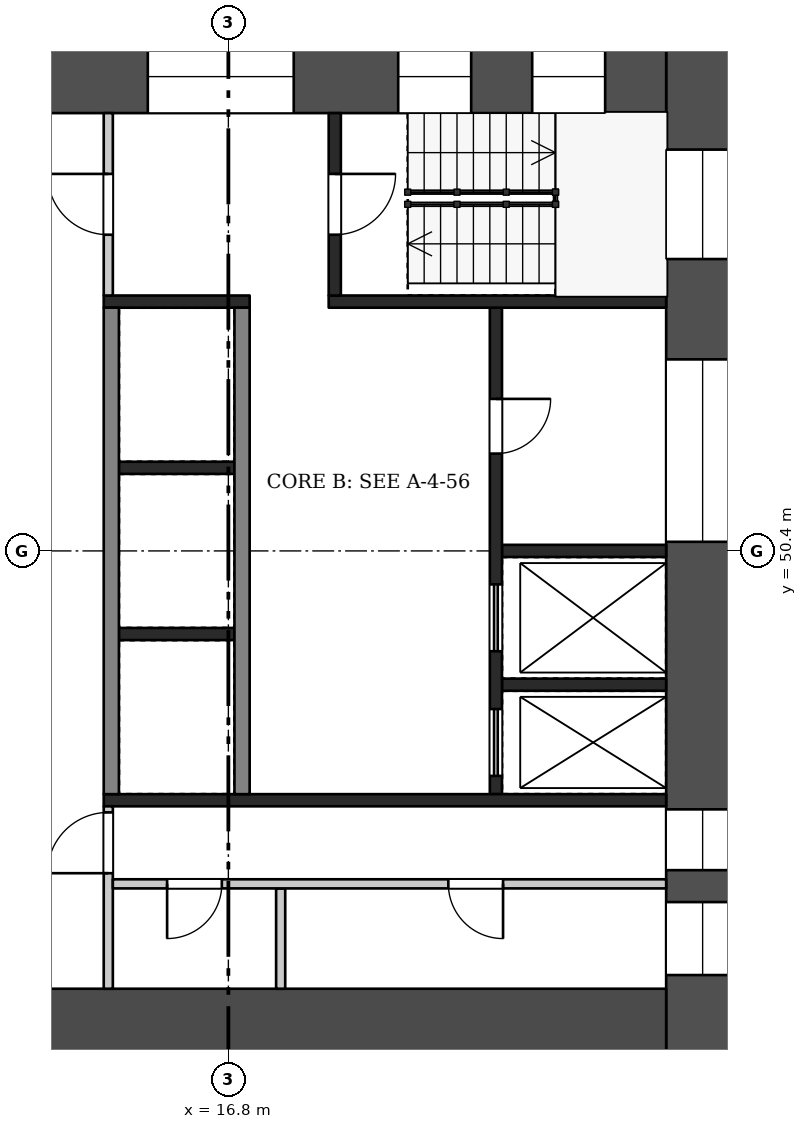
"""IFC4 building model, lengths in metres.
Left out: names, types, materials, properties, quantities, classifications, styles, units other than length and angle.
Written with IfcOpenShell. Run it as: python <this file> out.ifc"""

import sys

from ifc_helpers import new_model, si_unit, direction, frame, frame_2d, origin, place, context, subcontext, project, spatial, rectangle, extrude, element, fill, save


model = new_model("IFC4")
c1 = context("Model", 3, precision=1e-05, world=origin(), true_north=direction((0.0, 1.0)))
c2 = subcontext(c1, "Body", "Model", "MODEL_VIEW")
j1 = project(units=[si_unit("LENGTHUNIT", "METRE"), si_unit("PLANEANGLEUNIT", "RADIAN")], contexts=[c1])
p1 = place(None, origin())
s1 = spatial("IfcSite", under=j1, at=p1, CompositionType="ELEMENT")
p2 = place(p1, origin())
s2 = spatial("IfcBuilding", under=s1, at=p2, CompositionType="ELEMENT")
p3 = place(p2, frame((0.0, 0.0, 126.7)))
s3 = spatial("IfcBuildingStorey", under=s2, at=p3, CompositionType="ELEMENT", Elevation=126.7)
p4 = place(p3, frame((24.6, 58.8, 0.0), z_axis=(0.0, 0.0, 1.0), x_axis=(0.0, -1.0, 0.0)))
e1 = element("IfcWall", 1, at=p4, inside=s3, PredefinedType="SHEAR", context=c2, shape_type="SweptSolid", body=[
    extrude(rectangle(XDim=16.8, YDim=1.2, at=frame_2d((8.4, 0.0))), origin(), (0.0, 0.0, 1.0), 3.22),
])
p5 = place(p4, frame((1.8, 0.0, 0.5)))
e2 = element("IfcOpeningElement", 2, at=p5, cuts=e1, PredefinedType="OPENING", context=c2, shape_type="SweptSolid", body=[
    extrude(rectangle(XDim=1.8, YDim=2.4, at=frame_2d((0.9, 1.2))), frame((0.0, 0.61, 0.0), z_axis=(0.0, -1.0, 0.0), x_axis=(1.0, 0.0, 0.0)), (0.0, 0.0, 1.0), 1.22),
])
p6 = place(p4, frame((5.25, 0.0, 1.6)))
e3 = element("IfcOpeningElement", 3, at=p6, cuts=e1, PredefinedType="OPENING", context=c2, shape_type="SweptSolid", body=[
    extrude(rectangle(XDim=3.0, YDim=1.2, at=frame_2d((1.5, 0.6))), frame((0.0, 0.61, 0.0), z_axis=(0.0, -1.0, 0.0), x_axis=(1.0, 0.0, 0.0)), (0.0, 0.0, 1.0), 1.22),
])
p7 = place(p4, frame((12.65, 0.0, 0.6)))
e4 = element("IfcOpeningElement", 4, at=p7, cuts=e1, PredefinedType="OPENING", context=c2, shape_type="SweptSolid", body=[
    extrude(rectangle(XDim=1.0, YDim=2.1, at=frame_2d((0.5, 1.05))), frame((0.0, 0.61, 0.0), z_axis=(0.0, -1.0, 0.0), x_axis=(1.0, 0.0, 0.0)), (0.0, 0.0, 1.0), 1.22),
])
p8 = place(p4, frame((14.175, 0.0, 1.6)))
e5 = element("IfcOpeningElement", 5, at=p8, cuts=e1, PredefinedType="OPENING", context=c2, shape_type="SweptSolid", body=[
    extrude(rectangle(XDim=1.2, YDim=1.2, at=frame_2d((0.6, 0.6))), frame((0.0, 0.61, 0.0), z_axis=(0.0, -1.0, 0.0), x_axis=(1.0, 0.0, 0.0)), (0.0, 0.0, 1.0), 1.22),
])
p9 = place(p3, frame((9.6, 58.2, 0.0), z_axis=(0.0, 0.0, 1.0), x_axis=(1.0, 0.0, 0.0)))
e6 = element("IfcWall", 6, at=p9, inside=s3, PredefinedType="SHEAR", context=c2, shape_type="SweptSolid", body=[
    extrude(rectangle(XDim=14.4, YDim=1.2, at=frame_2d((7.2, 0.0))), origin(), (0.0, 0.0, 1.0), 3.22),
])
p10 = place(p9, frame((1.105, 0.0, 0.6)))
e7 = element("IfcOpeningElement", 7, at=p10, cuts=e6, PredefinedType="OPENING", context=c2, shape_type="SweptSolid", body=[
    extrude(rectangle(XDim=3.0, YDim=2.1, at=frame_2d((1.5, 1.05))), frame((0.0, 0.61, 0.0), z_axis=(0.0, -1.0, 0.0), x_axis=(1.0, 0.0, 0.0)), (0.0, 0.0, 1.0), 1.22),
])
p11 = place(p9, frame((5.875, 0.0, 0.6)))
e8 = element("IfcOpeningElement", 8, at=p11, cuts=e6, PredefinedType="OPENING", context=c2, shape_type="SweptSolid", body=[
    extrude(rectangle(XDim=2.4, YDim=2.1, at=frame_2d((1.2, 1.05))), frame((0.0, 0.61, 0.0), z_axis=(0.0, -1.0, 0.0), x_axis=(1.0, 0.0, 0.0)), (0.0, 0.0, 1.0), 1.22),
])
p12 = place(p9, frame((9.993, 0.0, 0.5)))
e9 = element("IfcOpeningElement", 9, at=p12, cuts=e6, PredefinedType="OPENING", context=c2, shape_type="SweptSolid", body=[
    extrude(rectangle(XDim=1.2, YDim=2.4, at=frame_2d((0.6, 1.2))), frame((0.0, 0.61, 0.0), z_axis=(0.0, -1.0, 0.0), x_axis=(1.0, 0.0, 0.0)), (0.0, 0.0, 1.0), 1.22),
])
p13 = place(p9, frame((12.197, 0.0, 0.5)))
e10 = element("IfcOpeningElement", 10, at=p13, cuts=e6, PredefinedType="OPENING", context=c2, shape_type="SweptSolid", body=[
    extrude(rectangle(XDim=1.2, YDim=2.4, at=frame_2d((0.6, 1.2))), frame((0.0, 0.61, 0.0), z_axis=(0.0, -1.0, 0.0), x_axis=(1.0, 0.0, 0.0)), (0.0, 0.0, 1.0), 1.22),
])
p14 = place(p3, frame((9.6, 42.6, 0.0), z_axis=(0.0, 0.0, 1.0), x_axis=(1.0, 0.0, 0.0)))
e11 = element("IfcWall", 11, at=p14, inside=s3, PredefinedType="SHEAR", context=c2, shape_type="SweptSolid", body=[
    extrude(rectangle(XDim=14.4, YDim=1.2, at=frame_2d((7.2, 0.0))), origin(), (0.0, 0.0, 1.0), 3.22),
])
p15 = place(p14, frame((2.1, 0.0, 0.0)))
e12 = element("IfcOpeningElement", 12, at=p15, cuts=e11, PredefinedType="OPENING", context=c2, shape_type="SweptSolid", body=[
    extrude(rectangle(XDim=1.8, YDim=2.1, at=frame_2d((0.9, 1.05))), frame((0.0, 0.61, 0.0), z_axis=(0.0, -1.0, 0.0), x_axis=(1.0, 0.0, 0.0)), (0.0, 0.0, 1.0), 1.22),
])
for number, where, z_axis, x_axis in (
    (13, (15.0, 51.767, 0.0), (0.0, 0.0, 1.0), (1.0, 0.0, 0.0)),
    (14, (15.0, 49.033, 0.0), (0.0, 0.0, 1.0), (1.0, 0.0, 0.0)),
):
    element("IfcWall", number, at=place(p3, frame(where, z_axis=z_axis, x_axis=x_axis)), inside=s3, PredefinedType="SHEAR", context=c2, shape_type="SweptSolid", body=[
        extrude(rectangle(XDim=1.9, YDim=0.2, at=frame_2d((0.95, 0.0))), origin(), (0.0, 0.0, 1.0), 3.22),
    ])
for number, where, z_axis, x_axis in (
    (15, (14.875, 54.4, 0.0), (0.0, 0.0, 1.0), (0.0, -1.0, 0.0)),
    (16, (17.025, 54.4, 0.0), (0.0, 0.0, 1.0), (0.0, -1.0, 0.0)),
):
    element("IfcWall", number, at=place(p3, frame(where, z_axis=z_axis, x_axis=x_axis)), inside=s3, PredefinedType="SHEAR", context=c2, shape_type="SweptSolid", body=[
        extrude(rectangle(XDim=8.0, YDim=0.25, at=frame_2d((4.0, 0.0))), origin(), (0.0, 0.0, 1.0), 3.22),
    ])
for number, where, z_axis, x_axis in (
    (17, (21.3, 50.4, 0.0), (0.0, 0.0, 1.0), (1.0, 0.0, 0.0)),
    (18, (21.3, 48.2, 0.0), (0.0, 0.0, 1.0), (1.0, 0.0, 0.0)),
):
    element("IfcWall", number, at=place(p3, frame(where, z_axis=z_axis, x_axis=x_axis)), inside=s3, PredefinedType="SHEAR", context=c2, shape_type="SweptSolid", body=[
        extrude(rectangle(XDim=2.7, YDim=0.2, at=frame_2d((1.35, 0.0))), origin(), (0.0, 0.0, 1.0), 3.22),
    ])
p16 = place(p3, frame((21.2, 54.4, 0.0), z_axis=(0.0, 0.0, 1.0), x_axis=(0.0, -1.0, 0.0)))
e19 = element("IfcWall", 19, at=p16, inside=s3, PredefinedType="SHEAR", context=c2, shape_type="SweptSolid", body=[
    extrude(rectangle(XDim=8.0, YDim=0.2, at=frame_2d((4.0, 0.0))), origin(), (0.0, 0.0, 1.0), 3.22),
])
p17 = place(p16, frame((1.5, 0.0, 0.0)))
e20 = element("IfcOpeningElement", 20, at=p17, cuts=e19, PredefinedType="OPENING", context=c2, shape_type="SweptSolid", body=[
    extrude(rectangle(XDim=0.9, YDim=2.1, at=frame_2d((0.45, 1.05))), frame((0.0, 0.11, 0.0), z_axis=(0.0, -1.0, 0.0), x_axis=(1.0, 0.0, 0.0)), (0.0, 0.0, 1.0), 0.22),
])
p18 = place(p16, frame((4.55, 0.0, 0.0)))
e21 = element("IfcOpeningElement", 21, at=p18, cuts=e19, PredefinedType="OPENING", context=c2, shape_type="SweptSolid", body=[
    extrude(rectangle(XDim=1.1, YDim=2.1, at=frame_2d((0.55, 1.05))), frame((0.0, 0.11, 0.0), z_axis=(0.0, -1.0, 0.0), x_axis=(1.0, 0.0, 0.0)), (0.0, 0.0, 1.0), 0.22),
])
p19 = place(p16, frame((6.6, 0.0, 0.0)))
e22 = element("IfcOpeningElement", 22, at=p19, cuts=e19, PredefinedType="OPENING", context=c2, shape_type="SweptSolid", body=[
    extrude(rectangle(XDim=1.1, YDim=2.1, at=frame_2d((0.55, 1.05))), frame((0.0, 0.11, 0.0), z_axis=(0.0, -1.0, 0.0), x_axis=(1.0, 0.0, 0.0)), (0.0, 0.0, 1.0), 0.22),
])
p20 = place(p3, frame((14.75, 54.5, 0.0), z_axis=(0.0, 0.0, 1.0), x_axis=(1.0, 0.0, 0.0)))
e23 = element("IfcWall", 23, at=p20, inside=s3, PredefinedType="SHEAR", context=c2, shape_type="SweptSolid", body=[
    extrude(rectangle(XDim=2.4, YDim=0.2, at=frame_2d((1.2, 0.0))), origin(), (0.0, 0.0, 1.0), 3.22),
])
p21 = place(p3, frame((18.45, 54.5, 0.0), z_axis=(0.0, 0.0, 1.0), x_axis=(1.0, 0.0, 0.0)))
e24 = element("IfcWall", 24, at=p21, inside=s3, PredefinedType="SHEAR", context=c2, shape_type="SweptSolid", body=[
    extrude(rectangle(XDim=5.55, YDim=0.2, at=frame_2d((2.775, 0.0))), origin(), (0.0, 0.0, 1.0), 3.22),
])
p22 = place(p3, frame((14.825, 57.6, 0.0), z_axis=(0.0, 0.0, 1.0), x_axis=(0.0, -1.0, 0.0)))
e25 = element("IfcWall", 25, at=p22, inside=s3, PredefinedType="PARTITIONING", context=c2, shape_type="SweptSolid", body=[
    extrude(rectangle(XDim=3.0, YDim=0.15, at=frame_2d((1.5, 0.0))), origin(), (0.0, 0.0, 1.0), 3.22),
])
p23 = place(p22, frame((1.0, 0.0, 0.0)))
e26 = element("IfcOpeningElement", 26, at=p23, cuts=e25, PredefinedType="OPENING", context=c2, shape_type="SweptSolid", body=[
    extrude(rectangle(XDim=1.0, YDim=2.1, at=frame_2d((0.5, 1.05))), frame((0.0, 0.085, 0.0), z_axis=(0.0, -1.0, 0.0), x_axis=(1.0, 0.0, 0.0)), (0.0, 0.0, 1.0), 0.17),
])
p24 = place(p3, frame((18.55, 57.6, 0.0), z_axis=(0.0, 0.0, 1.0), x_axis=(0.0, -1.0, 0.0)))
e27 = element("IfcWall", 27, at=p24, inside=s3, PredefinedType="SHEAR", context=c2, shape_type="SweptSolid", body=[
    extrude(rectangle(XDim=3.0, YDim=0.2, at=frame_2d((1.5, 0.0))), origin(), (0.0, 0.0, 1.0), 3.22),
])
p25 = place(p24, frame((1.0, 0.0, 0.0)))
e28 = element("IfcOpeningElement", 28, at=p25, cuts=e27, PredefinedType="OPENING", context=c2, shape_type="SweptSolid", body=[
    extrude(rectangle(XDim=1.0, YDim=2.1, at=frame_2d((0.5, 1.05))), frame((0.0, 0.11, 0.0), z_axis=(0.0, -1.0, 0.0), x_axis=(1.0, 0.0, 0.0)), (0.0, 0.0, 1.0), 0.22),
])
p26 = place(p3, frame((14.75, 46.3, 0.0), z_axis=(0.0, 0.0, 1.0), x_axis=(1.0, 0.0, 0.0)))
e29 = element("IfcWall", 29, at=p26, inside=s3, PredefinedType="SHEAR", context=c2, shape_type="SweptSolid", body=[
    extrude(rectangle(XDim=9.25, YDim=0.2, at=frame_2d((4.625, 0.0))), origin(), (0.0, 0.0, 1.0), 3.22),
])
p27 = place(p3, frame((14.825, 46.2, 0.0), z_axis=(0.0, 0.0, 1.0), x_axis=(0.0, -1.0, 0.0)))
e30 = element("IfcWall", 30, at=p27, inside=s3, PredefinedType="PARTITIONING", context=c2, shape_type="SweptSolid", body=[
    extrude(rectangle(XDim=3.0, YDim=0.15, at=frame_2d((1.5, 0.0))), origin(), (0.0, 0.0, 1.0), 3.22),
])
p28 = place(p27, frame((0.1, 0.0, 0.0)))
e31 = element("IfcOpeningElement", 31, at=p28, cuts=e30, PredefinedType="OPENING", context=c2, shape_type="SweptSolid", body=[
    extrude(rectangle(XDim=1.0, YDim=2.1, at=frame_2d((0.5, 1.05))), frame((0.0, 0.085, 0.0), z_axis=(0.0, -1.0, 0.0), x_axis=(1.0, 0.0, 0.0)), (0.0, 0.0, 1.0), 0.17),
])
p29 = place(p3, frame((17.66, 44.85, 0.0), z_axis=(0.0, 0.0, 1.0), x_axis=(0.0, -1.0, 0.0)))
e32 = element("IfcWall", 32, at=p29, inside=s3, PredefinedType="PARTITIONING", context=c2, shape_type="SweptSolid", body=[
    extrude(rectangle(XDim=1.65, YDim=0.15, at=frame_2d((0.825, 0.0))), origin(), (0.0, 0.0, 1.0), 3.22),
])
p30 = place(p3, frame((14.9, 44.925, 0.0), z_axis=(0.0, 0.0, 1.0), x_axis=(1.0, 0.0, 0.0)))
e33 = element("IfcWall", 33, at=p30, inside=s3, PredefinedType="PARTITIONING", context=c2, shape_type="SweptSolid", body=[
    extrude(rectangle(XDim=9.1, YDim=0.15, at=frame_2d((4.55, 0.0))), origin(), (0.0, 0.0, 1.0), 3.22),
])
p31 = place(p30, frame((0.893, 0.0, 0.0)))
e34 = element("IfcOpeningElement", 34, at=p31, cuts=e33, PredefinedType="OPENING", context=c2, shape_type="SweptSolid", body=[
    extrude(rectangle(XDim=0.9, YDim=2.1, at=frame_2d((0.45, 1.05))), frame((0.0, 0.085, 0.0), z_axis=(0.0, -1.0, 0.0), x_axis=(1.0, 0.0, 0.0)), (0.0, 0.0, 1.0), 0.17),
])
p32 = place(p30, frame((5.518, 0.0, 0.0)))
e35 = element("IfcOpeningElement", 35, at=p32, cuts=e33, PredefinedType="OPENING", context=c2, shape_type="SweptSolid", body=[
    extrude(rectangle(XDim=0.9, YDim=2.1, at=frame_2d((0.45, 1.05))), frame((0.0, 0.085, 0.0), z_axis=(0.0, -1.0, 0.0), x_axis=(1.0, 0.0, 0.0)), (0.0, 0.0, 1.0), 0.17),
])
p33 = place(p17, origin())
e36 = element("IfcDoor", 36, at=p33, inside=s3, OperationType="SINGLE_SWING_LEFT", PredefinedType="DOOR", context=c2, shape_type="SweptSolid", body=[
    extrude(rectangle(XDim=0.9, YDim=2.1, at=frame_2d((0.45, 1.05))), frame((0.0, 0.025, 0.0), z_axis=(0.0, -1.0, 0.0), x_axis=(1.0, 0.0, 0.0)), (0.0, 0.0, 1.0), 0.05),
])
fill(e20, e36)
p34 = place(p18, origin())
e37 = element("IfcDoor", 37, at=p34, inside=s3, OperationType="DOUBLE_DOOR_SLIDING", PredefinedType="DOOR", context=c2, shape_type="SweptSolid", body=[
    extrude(rectangle(XDim=1.1, YDim=2.1, at=frame_2d((0.55, 1.05))), frame((0.0, 0.025, 0.0), z_axis=(0.0, -1.0, 0.0), x_axis=(1.0, 0.0, 0.0)), (0.0, 0.0, 1.0), 0.05),
])
fill(e21, e37)
p35 = place(p19, origin())
e38 = element("IfcDoor", 38, at=p35, inside=s3, OperationType="DOUBLE_DOOR_SLIDING", PredefinedType="DOOR", context=c2, shape_type="SweptSolid", body=[
    extrude(rectangle(XDim=1.1, YDim=2.1, at=frame_2d((0.55, 1.05))), frame((0.0, 0.025, 0.0), z_axis=(0.0, -1.0, 0.0), x_axis=(1.0, 0.0, 0.0)), (0.0, 0.0, 1.0), 0.05),
])
fill(e22, e38)
p36 = place(p23, frame((1.0, 0.0, 0.0), z_axis=(0.0, 0.0, 1.0), x_axis=(-1.0, 0.0, 0.0)))
e39 = element("IfcDoor", 39, at=p36, inside=s3, OperationType="SINGLE_SWING_RIGHT", PredefinedType="DOOR", context=c2, shape_type="SweptSolid", body=[
    extrude(rectangle(XDim=1.0, YDim=2.1, at=frame_2d((0.5, 1.05))), frame((0.0, 0.025, 0.0), z_axis=(0.0, -1.0, 0.0), x_axis=(1.0, 0.0, 0.0)), (0.0, 0.0, 1.0), 0.05),
])
fill(e26, e39)
p37 = place(p25, origin())
e40 = element("IfcDoor", 40, at=p37, inside=s3, OperationType="SINGLE_SWING_LEFT", PredefinedType="DOOR", context=c2, shape_type="SweptSolid", body=[
    extrude(rectangle(XDim=1.0, YDim=2.1, at=frame_2d((0.5, 1.05))), frame((0.0, 0.025, 0.0), z_axis=(0.0, -1.0, 0.0), x_axis=(1.0, 0.0, 0.0)), (0.0, 0.0, 1.0), 0.05),
])
fill(e28, e40)
p38 = place(p28, frame((1.0, 0.0, 0.0), z_axis=(0.0, 0.0, 1.0), x_axis=(-1.0, 0.0, 0.0)))
e41 = element("IfcDoor", 41, at=p38, inside=s3, OperationType="SINGLE_SWING_LEFT", PredefinedType="DOOR", context=c2, shape_type="SweptSolid", body=[
    extrude(rectangle(XDim=1.0, YDim=2.1, at=frame_2d((0.5, 1.05))), frame((0.0, 0.025, 0.0), z_axis=(0.0, -1.0, 0.0), x_axis=(1.0, 0.0, 0.0)), (0.0, 0.0, 1.0), 0.05),
])
fill(e31, e41)
p39 = place(p31, frame((0.9, 0.0, 0.0), z_axis=(0.0, 0.0, 1.0), x_axis=(-1.0, 0.0, 0.0)))
e42 = element("IfcDoor", 42, at=p39, inside=s3, OperationType="SINGLE_SWING_RIGHT", PredefinedType="DOOR", context=c2, shape_type="SweptSolid", body=[
    extrude(rectangle(XDim=0.9, YDim=2.1, at=frame_2d((0.45, 1.05))), frame((0.0, 0.025, 0.0), z_axis=(0.0, -1.0, 0.0), x_axis=(1.0, 0.0, 0.0)), (0.0, 0.0, 1.0), 0.05),
])
fill(e34, e42)
p40 = place(p32, frame((0.9, 0.0, 0.0), z_axis=(0.0, 0.0, 1.0), x_axis=(-1.0, 0.0, 0.0)))
e43 = element("IfcDoor", 43, at=p40, inside=s3, OperationType="SINGLE_SWING_LEFT", PredefinedType="DOOR", context=c2, shape_type="SweptSolid", body=[
    extrude(rectangle(XDim=0.9, YDim=2.1, at=frame_2d((0.45, 1.05))), frame((0.0, 0.025, 0.0), z_axis=(0.0, -1.0, 0.0), x_axis=(1.0, 0.0, 0.0)), (0.0, 0.0, 1.0), 0.05),
])
fill(e35, e43)
p41 = place(p5, origin())
e44 = element("IfcWindow", 44, at=p41, inside=s3, PartitioningType="SINGLE_PANEL", PredefinedType="WINDOW", context=c2, shape_type="SweptSolid", body=[
    extrude(rectangle(XDim=1.8, YDim=2.4, at=frame_2d((0.9, 1.2))), frame((0.0, 0.03, 0.0), z_axis=(0.0, -1.0, 0.0), x_axis=(1.0, 0.0, 0.0)), (0.0, 0.0, 1.0), 0.06),
])
fill(e2, e44)
p42 = place(p6, origin())
e45 = element("IfcWindow", 45, at=p42, inside=s3, PartitioningType="SINGLE_PANEL", PredefinedType="WINDOW", context=c2, shape_type="SweptSolid", body=[
    extrude(rectangle(XDim=3.0, YDim=1.2, at=frame_2d((1.5, 0.6))), frame((0.0, 0.03, 0.0), z_axis=(0.0, -1.0, 0.0), x_axis=(1.0, 0.0, 0.0)), (0.0, 0.0, 1.0), 0.06),
])
fill(e3, e45)
p43 = place(p7, origin())
e46 = element("IfcWindow", 46, at=p43, inside=s3, PartitioningType="SINGLE_PANEL", PredefinedType="WINDOW", context=c2, shape_type="SweptSolid", body=[
    extrude(rectangle(XDim=1.0, YDim=2.1, at=frame_2d((0.5, 1.05))), frame((0.0, 0.03, 0.0), z_axis=(0.0, -1.0, 0.0), x_axis=(1.0, 0.0, 0.0)), (0.0, 0.0, 1.0), 0.06),
])
fill(e4, e46)
p44 = place(p8, origin())
e47 = element("IfcWindow", 47, at=p44, inside=s3, PartitioningType="SINGLE_PANEL", PredefinedType="WINDOW", context=c2, shape_type="SweptSolid", body=[
    extrude(rectangle(XDim=1.2, YDim=1.2, at=frame_2d((0.6, 0.6))), frame((0.0, 0.03, 0.0), z_axis=(0.0, -1.0, 0.0), x_axis=(1.0, 0.0, 0.0)), (0.0, 0.0, 1.0), 0.06),
])
fill(e5, e47)
p45 = place(p11, origin())
e48 = element("IfcWindow", 48, at=p45, inside=s3, PartitioningType="SINGLE_PANEL", PredefinedType="WINDOW", context=c2, shape_type="SweptSolid", body=[
    extrude(rectangle(XDim=2.4, YDim=2.1, at=frame_2d((1.2, 1.05))), frame((0.0, 0.03, 0.0), z_axis=(0.0, -1.0, 0.0), x_axis=(1.0, 0.0, 0.0)), (0.0, 0.0, 1.0), 0.06),
])
fill(e8, e48)
p46 = place(p12, origin())
e49 = element("IfcWindow", 49, at=p46, inside=s3, PartitioningType="SINGLE_PANEL", PredefinedType="WINDOW", context=c2, shape_type="SweptSolid", body=[
    extrude(rectangle(XDim=1.2, YDim=2.4, at=frame_2d((0.6, 1.2))), frame((0.0, 0.03, 0.0), z_axis=(0.0, -1.0, 0.0), x_axis=(1.0, 0.0, 0.0)), (0.0, 0.0, 1.0), 0.06),
])
fill(e9, e49)
p47 = place(p13, origin())
e50 = element("IfcWindow", 50, at=p47, inside=s3, PartitioningType="SINGLE_PANEL", PredefinedType="WINDOW", context=c2, shape_type="SweptSolid", body=[
    extrude(rectangle(XDim=1.2, YDim=2.4, at=frame_2d((0.6, 1.2))), frame((0.0, 0.03, 0.0), z_axis=(0.0, -1.0, 0.0), x_axis=(1.0, 0.0, 0.0)), (0.0, 0.0, 1.0), 0.06),
])
fill(e10, e50)
save(model, sys.argv[1])
